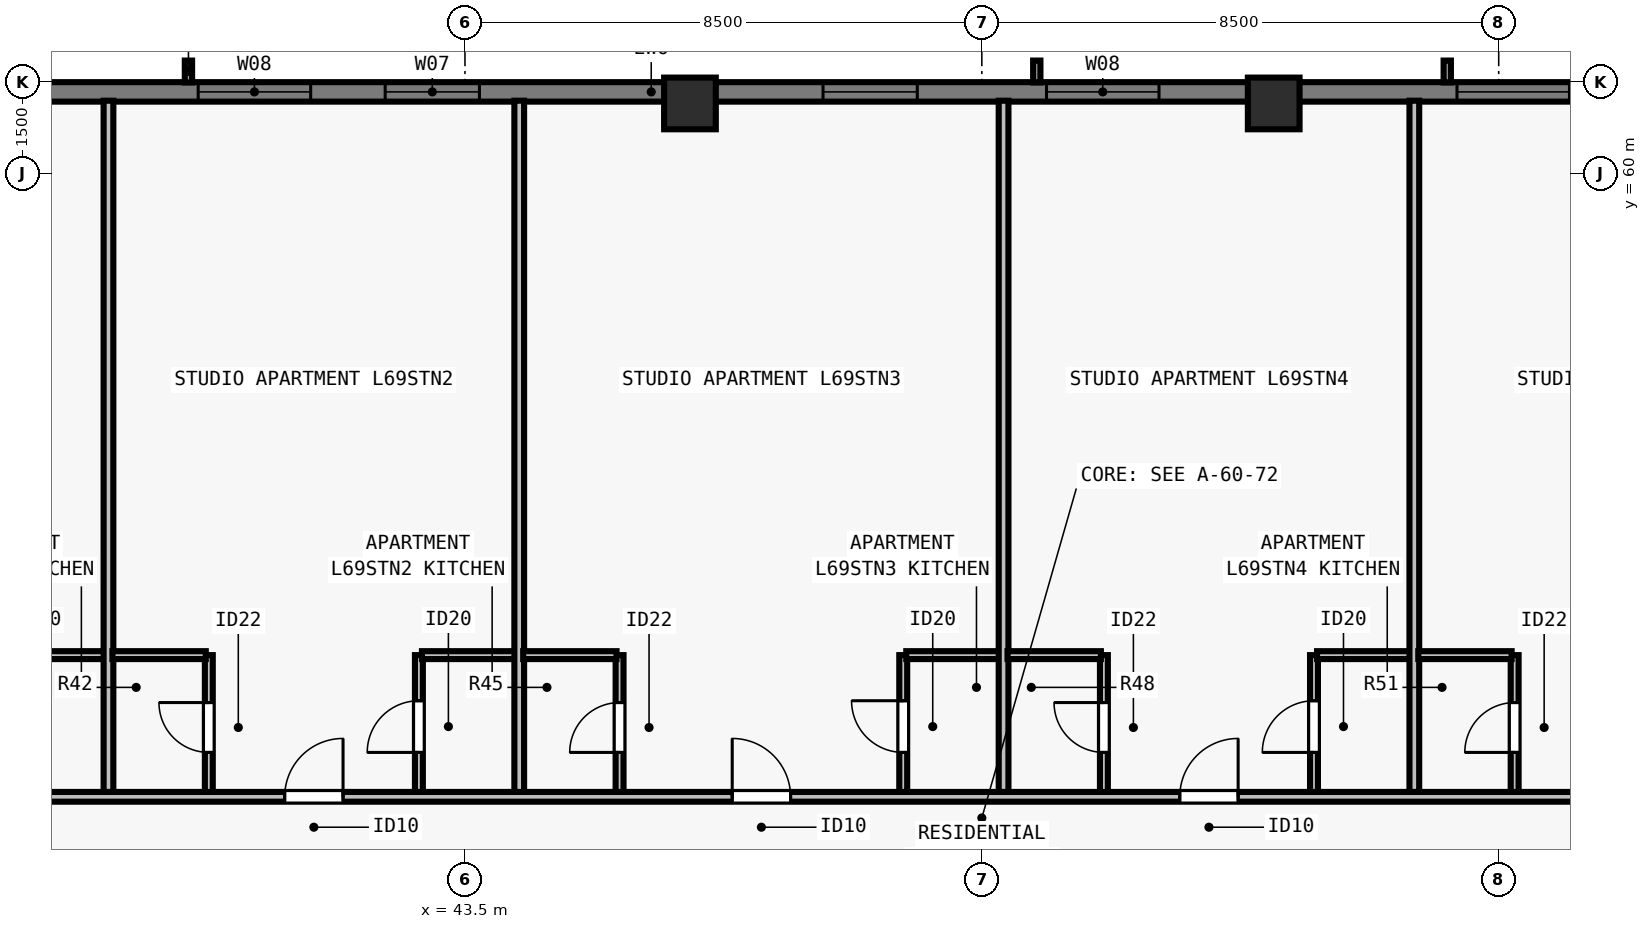
"""IFC4 building model, lengths in metres.
Left out: names, types, materials, properties, quantities, classifications, styles, units other than length and angle.
Written with IfcOpenShell. Run it as: python <this file> out.ifc"""

import sys

from ifc_helpers import new_model, si_unit, direction, frame, frame_2d, origin, origin_2d, place, context, subcontext, project, spatial, rectangle, extrude, element, fill, save


model = new_model("IFC4")
c1 = context("Model", 3, precision=1e-05, world=origin(), true_north=direction((0.0, 1.0)))
c2 = subcontext(c1, "Body", "Model", "MODEL_VIEW")
j1 = project(units=[si_unit("LENGTHUNIT", "METRE"), si_unit("PLANEANGLEUNIT", "RADIAN")], contexts=[c1])
p1 = place(None, origin())
s1 = spatial("IfcSite", under=j1, at=p1, CompositionType="ELEMENT")
p2 = place(p1, origin())
s2 = spatial("IfcBuilding", under=s1, at=p2, CompositionType="ELEMENT")
p3 = place(p2, frame((0.0, 0.0, 251.5)))
s3 = spatial("IfcBuildingStorey", under=s2, at=p3, CompositionType="ELEMENT", Elevation=251.5)
for number, where, z_axis, x_axis in (
    (1, (56.8, 61.15, 0.0), (0.0, 0.0, 1.0), (1.0, 0.0, 0.0)),
    (2, (47.2, 61.15, 0.0), (0.0, 0.0, 1.0), (1.0, 0.0, 0.0)),
):
    element("IfcColumn", number, at=place(p3, frame(where, z_axis=z_axis, x_axis=x_axis)), inside=s3, PredefinedType="COLUMN", context=c2, shape_type="SweptSolid", body=[
        extrude(rectangle(XDim=0.85, YDim=0.85, at=origin_2d()), origin(), (0.0, 0.0, 1.0), 3.5),
    ])
p4 = place(p3, frame((34.5, 61.34, 0.0), z_axis=(0.0, 0.0, 1.0), x_axis=(1.0, 0.0, 0.0)))
e3 = element("IfcWall", 3, at=p4, inside=s3, PredefinedType="SOLIDWALL", context=c2, shape_type="SweptSolid", body=[
    extrude(rectangle(XDim=34.702, YDim=0.32, at=frame_2d((17.351, 0.0))), origin(), (0.0, 0.0, 1.0), 3.29),
])
p5 = place(p4, frame((4.613, 0.0, 0.8)))
e4 = element("IfcOpeningElement", 4, at=p5, cuts=e3, PredefinedType="OPENING", context=c2, shape_type="SweptSolid", body=[
    extrude(rectangle(XDim=1.85, YDim=1.678, at=frame_2d((0.925, 0.839))), frame((0.0, 0.17, 0.0), z_axis=(0.0, -1.0, 0.0), x_axis=(1.0, 0.0, 0.0)), (0.0, 0.0, 1.0), 0.34),
])
p6 = place(p4, frame((7.688, 0.0, 0.8)))
e5 = element("IfcOpeningElement", 5, at=p6, cuts=e3, PredefinedType="OPENING", context=c2, shape_type="SweptSolid", body=[
    extrude(rectangle(XDim=1.55, YDim=1.678, at=frame_2d((0.775, 0.839))), frame((0.0, 0.17, 0.0), z_axis=(0.0, -1.0, 0.0), x_axis=(1.0, 0.0, 0.0)), (0.0, 0.0, 1.0), 0.34),
])
p7 = place(p4, frame((14.888, 0.0, 0.8)))
e6 = element("IfcOpeningElement", 6, at=p7, cuts=e3, PredefinedType="OPENING", context=c2, shape_type="SweptSolid", body=[
    extrude(rectangle(XDim=1.55, YDim=1.678, at=frame_2d((0.775, 0.839))), frame((0.0, 0.17, 0.0), z_axis=(0.0, -1.0, 0.0), x_axis=(1.0, 0.0, 0.0)), (0.0, 0.0, 1.0), 0.34),
])
p8 = place(p4, frame((18.564, 0.0, 0.8)))
e7 = element("IfcOpeningElement", 7, at=p8, cuts=e3, PredefinedType="OPENING", context=c2, shape_type="SweptSolid", body=[
    extrude(rectangle(XDim=1.85, YDim=1.678, at=frame_2d((0.925, 0.839))), frame((0.0, 0.17, 0.0), z_axis=(0.0, -1.0, 0.0), x_axis=(1.0, 0.0, 0.0)), (0.0, 0.0, 1.0), 0.34),
])
p9 = place(p4, frame((25.314, 0.0, 0.8)))
e8 = element("IfcOpeningElement", 8, at=p9, cuts=e3, PredefinedType="OPENING", context=c2, shape_type="SweptSolid", body=[
    extrude(rectangle(XDim=1.85, YDim=1.678, at=frame_2d((0.925, 0.839))), frame((0.0, 0.17, 0.0), z_axis=(0.0, -1.0, 0.0), x_axis=(1.0, 0.0, 0.0)), (0.0, 0.0, 1.0), 0.34),
])
p10 = place(p4, frame((28.389, 0.0, 0.8)))
e9 = element("IfcOpeningElement", 9, at=p10, cuts=e3, PredefinedType="OPENING", context=c2, shape_type="SweptSolid", body=[
    extrude(rectangle(XDim=1.55, YDim=1.678, at=frame_2d((0.775, 0.839))), frame((0.0, 0.17, 0.0), z_axis=(0.0, -1.0, 0.0), x_axis=(1.0, 0.0, 0.0)), (0.0, 0.0, 1.0), 0.34),
])
p11 = place(p3, frame((29.805, 49.748, 0.0), z_axis=(0.0, 0.0, 1.0), x_axis=(1.0, 0.0, 0.0)))
e10 = element("IfcWall", 10, at=p11, inside=s3, PredefinedType="PARTITIONING", context=c2, shape_type="SweptSolid", body=[
    extrude(rectangle(XDim=44.39, YDim=0.16, at=frame_2d((22.195, 0.0))), origin(), (0.0, 0.0, 1.0), 2.958),
])
p12 = place(p11, frame((3.494, 0.0, 0.0)))
e11 = element("IfcOpeningElement", 11, at=p12, cuts=e10, PredefinedType="OPENING", context=c2, shape_type="SweptSolid", body=[
    extrude(rectangle(XDim=0.96, YDim=2.18, at=frame_2d((0.48, 1.09))), frame((0.0, 0.09, 0.0), z_axis=(0.0, -1.0, 0.0), x_axis=(1.0, 0.0, 0.0)), (0.0, 0.0, 1.0), 0.18),
])
p13 = place(p11, frame((10.73, 0.0, 0.0)))
e12 = element("IfcOpeningElement", 12, at=p13, cuts=e10, PredefinedType="OPENING", context=c2, shape_type="SweptSolid", body=[
    extrude(rectangle(XDim=0.96, YDim=2.18, at=frame_2d((0.48, 1.09))), frame((0.0, 0.09, 0.0), z_axis=(0.0, -1.0, 0.0), x_axis=(1.0, 0.0, 0.0)), (0.0, 0.0, 1.0), 0.18),
])
p14 = place(p11, frame((18.09, 0.0, 0.0)))
e13 = element("IfcOpeningElement", 13, at=p14, cuts=e10, PredefinedType="OPENING", context=c2, shape_type="SweptSolid", body=[
    extrude(rectangle(XDim=0.96, YDim=2.18, at=frame_2d((0.48, 1.09))), frame((0.0, 0.09, 0.0), z_axis=(0.0, -1.0, 0.0), x_axis=(1.0, 0.0, 0.0)), (0.0, 0.0, 1.0), 0.18),
])
p15 = place(p11, frame((25.45, 0.0, 0.0)))
e14 = element("IfcOpeningElement", 14, at=p15, cuts=e10, PredefinedType="OPENING", context=c2, shape_type="SweptSolid", body=[
    extrude(rectangle(XDim=0.96, YDim=2.18, at=frame_2d((0.48, 1.09))), frame((0.0, 0.09, 0.0), z_axis=(0.0, -1.0, 0.0), x_axis=(1.0, 0.0, 0.0)), (0.0, 0.0, 1.0), 0.18),
])
p16 = place(p11, frame((32.81, 0.0, 0.0)))
e15 = element("IfcOpeningElement", 15, at=p16, cuts=e10, PredefinedType="OPENING", context=c2, shape_type="SweptSolid", body=[
    extrude(rectangle(XDim=0.96, YDim=2.18, at=frame_2d((0.48, 1.09))), frame((0.0, 0.09, 0.0), z_axis=(0.0, -1.0, 0.0), x_axis=(1.0, 0.0, 0.0)), (0.0, 0.0, 1.0), 0.18),
])
p17 = place(p11, frame((40.294, 0.0, 0.0)))
e16 = element("IfcOpeningElement", 16, at=p17, cuts=e10, PredefinedType="OPENING", context=c2, shape_type="SweptSolid", body=[
    extrude(rectangle(XDim=0.96, YDim=2.18, at=frame_2d((0.48, 1.09))), frame((0.0, 0.09, 0.0), z_axis=(0.0, -1.0, 0.0), x_axis=(1.0, 0.0, 0.0)), (0.0, 0.0, 1.0), 0.18),
])
p18 = place(p3, frame((36.038, 52.077, 0.0), z_axis=(0.0, 0.0, 1.0), x_axis=(1.0, 0.0, 0.0)))
e17 = element("IfcWall", 17, at=p18, inside=s3, PredefinedType="PLUMBINGWALL", context=c2, shape_type="SweptSolid", body=[
    extrude(rectangle(XDim=1.6, YDim=0.13, at=frame_2d((0.8, 0.0))), origin(), (0.0, 0.0, 1.0), 2.958),
])
p19 = place(p3, frame((37.637, 49.827, 0.0), z_axis=(0.0, 0.0, 1.0), x_axis=(0.0, 1.0, 0.0)))
e18 = element("IfcWall", 18, at=p19, inside=s3, PredefinedType="PARTITIONING", context=c2, shape_type="SweptSolid", body=[
    extrude(rectangle(XDim=11.368, YDim=0.16, at=frame_2d((5.684, 0.0))), origin(), (0.0, 0.0, 1.0), 2.573),
])
p20 = place(p3, frame((39.288, 49.827, 0.0), z_axis=(0.0, 0.0, 1.0), x_axis=(0.0, 1.0, 0.0)))
e19 = element("IfcWall", 19, at=p20, inside=s3, PredefinedType="PLUMBINGWALL", context=c2, shape_type="SweptSolid", body=[
    extrude(rectangle(XDim=2.25, YDim=0.13, at=frame_2d((1.125, 0.0))), origin(), (0.0, 0.0, 1.0), 3.29),
])
p21 = place(p20, frame((0.65, 0.0, 0.0)))
e20 = element("IfcOpeningElement", 20, at=p21, cuts=e19, PredefinedType="OPENING", context=c2, shape_type="SweptSolid", body=[
    extrude(rectangle(XDim=0.82, YDim=2.1, at=frame_2d((0.41, 1.05))), frame((0.0, 0.075, 0.0), z_axis=(0.0, -1.0, 0.0), x_axis=(1.0, 0.0, 0.0)), (0.0, 0.0, 1.0), 0.15),
])
p22 = place(p3, frame((37.702, 52.077, 0.0), z_axis=(0.0, 0.0, 1.0), x_axis=(1.0, 0.0, 0.0)))
e21 = element("IfcWall", 21, at=p22, inside=s3, PredefinedType="PLUMBINGWALL", context=c2, shape_type="SweptSolid", body=[
    extrude(rectangle(XDim=1.535, YDim=0.13, at=frame_2d((0.768, 0.0))), origin(), (0.0, 0.0, 1.0), 3.29),
])
p23 = place(p3, frame((42.742, 49.827, 0.0), z_axis=(0.0, 0.0, 1.0), x_axis=(0.0, 1.0, 0.0)))
e22 = element("IfcWall", 22, at=p23, inside=s3, PredefinedType="PLUMBINGWALL", context=c2, shape_type="SweptSolid", body=[
    extrude(rectangle(XDim=2.25, YDim=0.13, at=frame_2d((1.125, 0.0))), origin(), (0.0, 0.0, 1.0), 3.29),
])
p24 = place(p23, frame((0.65, 0.0, 0.0)))
e23 = element("IfcOpeningElement", 23, at=p24, cuts=e22, PredefinedType="OPENING", context=c2, shape_type="SweptSolid", body=[
    extrude(rectangle(XDim=0.85, YDim=2.1, at=frame_2d((0.425, 1.05))), frame((0.0, 0.075, 0.0), z_axis=(0.0, -1.0, 0.0), x_axis=(1.0, 0.0, 0.0)), (0.0, 0.0, 1.0), 0.15),
])
p25 = place(p3, frame((42.792, 52.077, 0.0), z_axis=(0.0, 0.0, 1.0), x_axis=(1.0, 0.0, 0.0)))
e24 = element("IfcWall", 24, at=p25, inside=s3, PredefinedType="PLUMBINGWALL", context=c2, shape_type="SweptSolid", body=[
    extrude(rectangle(XDim=1.6, YDim=0.13, at=frame_2d((0.8, 0.0))), origin(), (0.0, 0.0, 1.0), 3.29),
])
p26 = place(p3, frame((44.393, 49.827, 0.0), z_axis=(0.0, 0.0, 1.0), x_axis=(0.0, 1.0, 0.0)))
e25 = element("IfcWall", 25, at=p26, inside=s3, PredefinedType="PARTITIONING", context=c2, shape_type="SweptSolid", body=[
    extrude(rectangle(XDim=11.368, YDim=0.16, at=frame_2d((5.684, 0.0))), origin(), (0.0, 0.0, 1.0), 3.29),
])
p27 = place(p3, frame((46.042, 49.827, 0.0), z_axis=(0.0, 0.0, 1.0), x_axis=(0.0, 1.0, 0.0)))
e26 = element("IfcWall", 26, at=p27, inside=s3, PredefinedType="PLUMBINGWALL", context=c2, shape_type="SweptSolid", body=[
    extrude(rectangle(XDim=2.25, YDim=0.13, at=frame_2d((1.125, 0.0))), origin(), (0.0, 0.0, 1.0), 3.29),
])
p28 = place(p27, frame((0.65, 0.0, 0.0)))
e27 = element("IfcOpeningElement", 27, at=p28, cuts=e26, PredefinedType="OPENING", context=c2, shape_type="SweptSolid", body=[
    extrude(rectangle(XDim=0.82, YDim=2.1, at=frame_2d((0.41, 1.05))), frame((0.0, 0.075, 0.0), z_axis=(0.0, -1.0, 0.0), x_axis=(1.0, 0.0, 0.0)), (0.0, 0.0, 1.0), 0.15),
])
p29 = place(p3, frame((44.458, 52.077, 0.0), z_axis=(0.0, 0.0, 1.0), x_axis=(1.0, 0.0, 0.0)))
e28 = element("IfcWall", 28, at=p29, inside=s3, PredefinedType="PLUMBINGWALL", context=c2, shape_type="SweptSolid", body=[
    extrude(rectangle(XDim=1.535, YDim=0.13, at=frame_2d((0.768, 0.0))), origin(), (0.0, 0.0, 1.0), 3.29),
])
p30 = place(p3, frame((50.708, 49.827, 0.0), z_axis=(0.0, 0.0, 1.0), x_axis=(0.0, 1.0, 0.0)))
e29 = element("IfcWall", 29, at=p30, inside=s3, PredefinedType="PLUMBINGWALL", context=c2, shape_type="SweptSolid", body=[
    extrude(rectangle(XDim=2.25, YDim=0.13, at=frame_2d((1.125, 0.0))), origin(), (0.0, 0.0, 1.0), 3.29),
])
p31 = place(p30, frame((0.65, 0.0, 0.0)))
e30 = element("IfcOpeningElement", 30, at=p31, cuts=e29, PredefinedType="OPENING", context=c2, shape_type="SweptSolid", body=[
    extrude(rectangle(XDim=0.85, YDim=2.1, at=frame_2d((0.425, 1.05))), frame((0.0, 0.075, 0.0), z_axis=(0.0, -1.0, 0.0), x_axis=(1.0, 0.0, 0.0)), (0.0, 0.0, 1.0), 0.15),
])
p32 = place(p3, frame((50.758, 52.077, 0.0), z_axis=(0.0, 0.0, 1.0), x_axis=(1.0, 0.0, 0.0)))
e31 = element("IfcWall", 31, at=p32, inside=s3, PredefinedType="PLUMBINGWALL", context=c2, shape_type="SweptSolid", body=[
    extrude(rectangle(XDim=1.6, YDim=0.13, at=frame_2d((0.8, 0.0))), origin(), (0.0, 0.0, 1.0), 3.29),
])
p33 = place(p3, frame((52.357, 49.827, 0.0), z_axis=(0.0, 0.0, 1.0), x_axis=(0.0, 1.0, 0.0)))
e32 = element("IfcWall", 32, at=p33, inside=s3, PredefinedType="PARTITIONING", context=c2, shape_type="SweptSolid", body=[
    extrude(rectangle(XDim=11.368, YDim=0.16, at=frame_2d((5.684, 0.0))), origin(), (0.0, 0.0, 1.0), 2.958),
])
p34 = place(p3, frame((54.008, 49.827, 0.0), z_axis=(0.0, 0.0, 1.0), x_axis=(0.0, 1.0, 0.0)))
e33 = element("IfcWall", 33, at=p34, inside=s3, PredefinedType="PLUMBINGWALL", context=c2, shape_type="SweptSolid", body=[
    extrude(rectangle(XDim=2.25, YDim=0.13, at=frame_2d((1.125, 0.0))), origin(), (0.0, 0.0, 1.0), 3.29),
])
p35 = place(p34, frame((0.65, 0.0, 0.0)))
e34 = element("IfcOpeningElement", 34, at=p35, cuts=e33, PredefinedType="OPENING", context=c2, shape_type="SweptSolid", body=[
    extrude(rectangle(XDim=0.82, YDim=2.1, at=frame_2d((0.41, 1.05))), frame((0.0, 0.075, 0.0), z_axis=(0.0, -1.0, 0.0), x_axis=(1.0, 0.0, 0.0)), (0.0, 0.0, 1.0), 0.15),
])
p36 = place(p3, frame((52.423, 52.077, 0.0), z_axis=(0.0, 0.0, 1.0), x_axis=(1.0, 0.0, 0.0)))
e35 = element("IfcWall", 35, at=p36, inside=s3, PredefinedType="PLUMBINGWALL", context=c2, shape_type="SweptSolid", body=[
    extrude(rectangle(XDim=1.535, YDim=0.13, at=frame_2d((0.768, 0.0))), origin(), (0.0, 0.0, 1.0), 3.29),
])
p37 = place(p3, frame((57.462, 49.827, 0.0), z_axis=(0.0, 0.0, 1.0), x_axis=(0.0, 1.0, 0.0)))
e36 = element("IfcWall", 36, at=p37, inside=s3, PredefinedType="PLUMBINGWALL", context=c2, shape_type="SweptSolid", body=[
    extrude(rectangle(XDim=2.25, YDim=0.13, at=frame_2d((1.125, 0.0))), origin(), (0.0, 0.0, 1.0), 3.29),
])
p38 = place(p37, frame((0.65, 0.0, 0.0)))
e37 = element("IfcOpeningElement", 37, at=p38, cuts=e36, PredefinedType="OPENING", context=c2, shape_type="SweptSolid", body=[
    extrude(rectangle(XDim=0.85, YDim=2.1, at=frame_2d((0.425, 1.05))), frame((0.0, 0.075, 0.0), z_axis=(0.0, -1.0, 0.0), x_axis=(1.0, 0.0, 0.0)), (0.0, 0.0, 1.0), 0.15),
])
p39 = place(p3, frame((57.512, 52.077, 0.0), z_axis=(0.0, 0.0, 1.0), x_axis=(1.0, 0.0, 0.0)))
e38 = element("IfcWall", 38, at=p39, inside=s3, PredefinedType="PLUMBINGWALL", context=c2, shape_type="SweptSolid", body=[
    extrude(rectangle(XDim=1.6, YDim=0.13, at=frame_2d((0.8, 0.0))), origin(), (0.0, 0.0, 1.0), 3.29),
])
p40 = place(p3, frame((59.113, 49.827, 0.0), z_axis=(0.0, 0.0, 1.0), x_axis=(0.0, 1.0, 0.0)))
e39 = element("IfcWall", 39, at=p40, inside=s3, PredefinedType="PARTITIONING", context=c2, shape_type="SweptSolid", body=[
    extrude(rectangle(XDim=11.368, YDim=0.16, at=frame_2d((5.684, 0.0))), origin(), (0.0, 0.0, 1.0), 3.29),
])
p41 = place(p3, frame((60.762, 49.827, 0.0), z_axis=(0.0, 0.0, 1.0), x_axis=(0.0, 1.0, 0.0)))
e40 = element("IfcWall", 40, at=p41, inside=s3, PredefinedType="PLUMBINGWALL", context=c2, shape_type="SweptSolid", body=[
    extrude(rectangle(XDim=2.25, YDim=0.13, at=frame_2d((1.125, 0.0))), origin(), (0.0, 0.0, 1.0), 3.29),
])
p42 = place(p41, frame((0.65, 0.0, 0.0)))
e41 = element("IfcOpeningElement", 41, at=p42, cuts=e40, PredefinedType="OPENING", context=c2, shape_type="SweptSolid", body=[
    extrude(rectangle(XDim=0.82, YDim=2.1, at=frame_2d((0.41, 1.05))), frame((0.0, 0.075, 0.0), z_axis=(0.0, -1.0, 0.0), x_axis=(1.0, 0.0, 0.0)), (0.0, 0.0, 1.0), 0.15),
])
p43 = place(p3, frame((59.177, 52.077, 0.0), z_axis=(0.0, 0.0, 1.0), x_axis=(1.0, 0.0, 0.0)))
e42 = element("IfcWall", 42, at=p43, inside=s3, PredefinedType="PLUMBINGWALL", context=c2, shape_type="SweptSolid", body=[
    extrude(rectangle(XDim=1.535, YDim=0.13, at=frame_2d((0.768, 0.0))), origin(), (0.0, 0.0, 1.0), 3.29),
])
p44 = place(p5, origin())
e43 = element("IfcWindow", 43, at=p44, inside=s3, PartitioningType="SINGLE_PANEL", PredefinedType="WINDOW", context=c2, shape_type="SweptSolid", body=[
    extrude(rectangle(XDim=1.85, YDim=1.678, at=frame_2d((0.925, 0.839))), frame((0.0, -0.05, 0.0), z_axis=(0.0, -1.0, 0.0), x_axis=(1.0, 0.0, 0.0)), (0.0, 0.0, 1.0), 0.06),
])
fill(e4, e43)
p45 = place(p6, origin())
e44 = element("IfcWindow", 44, at=p45, inside=s3, PartitioningType="SINGLE_PANEL", PredefinedType="WINDOW", context=c2, shape_type="SweptSolid", body=[
    extrude(rectangle(XDim=1.55, YDim=1.678, at=frame_2d((0.775, 0.839))), frame((0.0, -0.05, 0.0), z_axis=(0.0, -1.0, 0.0), x_axis=(1.0, 0.0, 0.0)), (0.0, 0.0, 1.0), 0.06),
])
fill(e5, e44)
p46 = place(p7, origin())
e45 = element("IfcWindow", 45, at=p46, inside=s3, PartitioningType="SINGLE_PANEL", PredefinedType="WINDOW", context=c2, shape_type="SweptSolid", body=[
    extrude(rectangle(XDim=1.55, YDim=1.678, at=frame_2d((0.775, 0.839))), frame((0.0, -0.05, 0.0), z_axis=(0.0, -1.0, 0.0), x_axis=(1.0, 0.0, 0.0)), (0.0, 0.0, 1.0), 0.06),
])
fill(e6, e45)
p47 = place(p8, origin())
e46 = element("IfcWindow", 46, at=p47, inside=s3, PartitioningType="SINGLE_PANEL", PredefinedType="WINDOW", context=c2, shape_type="SweptSolid", body=[
    extrude(rectangle(XDim=1.85, YDim=1.678, at=frame_2d((0.925, 0.839))), frame((0.0, -0.05, 0.0), z_axis=(0.0, -1.0, 0.0), x_axis=(1.0, 0.0, 0.0)), (0.0, 0.0, 1.0), 0.06),
])
fill(e7, e46)
p48 = place(p9, origin())
e47 = element("IfcWindow", 47, at=p48, inside=s3, PartitioningType="SINGLE_PANEL", PredefinedType="WINDOW", context=c2, shape_type="SweptSolid", body=[
    extrude(rectangle(XDim=1.85, YDim=1.678, at=frame_2d((0.925, 0.839))), frame((0.0, -0.05, 0.0), z_axis=(0.0, -1.0, 0.0), x_axis=(1.0, 0.0, 0.0)), (0.0, 0.0, 1.0), 0.06),
])
fill(e8, e47)
p49 = place(p21, origin())
e48 = element("IfcDoor", 48, at=p49, inside=s3, OperationType="SINGLE_SWING_RIGHT", PredefinedType="DOOR", context=c2, shape_type="SweptSolid", body=[
    extrude(rectangle(XDim=0.82, YDim=2.1, at=frame_2d((0.41, 1.05))), frame((0.0, 0.025, 0.0), z_axis=(0.0, -1.0, 0.0), x_axis=(1.0, 0.0, 0.0)), (0.0, 0.0, 1.0), 0.05),
])
fill(e20, e48)
p50 = place(p24, origin())
e49 = element("IfcDoor", 49, at=p50, inside=s3, OperationType="SINGLE_SWING_LEFT", PredefinedType="DOOR", context=c2, shape_type="SweptSolid", body=[
    extrude(rectangle(XDim=0.85, YDim=2.1, at=frame_2d((0.425, 1.05))), frame((0.0, 0.025, 0.0), z_axis=(0.0, -1.0, 0.0), x_axis=(1.0, 0.0, 0.0)), (0.0, 0.0, 1.0), 0.05),
])
fill(e23, e49)
p51 = place(p13, origin())
e50 = element("IfcDoor", 50, at=p51, inside=s3, OperationType="SINGLE_SWING_RIGHT", PredefinedType="DOOR", context=c2, shape_type="SweptSolid", body=[
    extrude(rectangle(XDim=0.96, YDim=2.18, at=frame_2d((0.48, 1.09))), frame((0.0, 0.025, 0.0), z_axis=(0.0, -1.0, 0.0), x_axis=(1.0, 0.0, 0.0)), (0.0, 0.0, 1.0), 0.05),
])
fill(e12, e50)
p52 = place(p28, origin())
e51 = element("IfcDoor", 51, at=p52, inside=s3, OperationType="SINGLE_SWING_LEFT", PredefinedType="DOOR", context=c2, shape_type="SweptSolid", body=[
    extrude(rectangle(XDim=0.82, YDim=2.1, at=frame_2d((0.41, 1.05))), frame((0.0, 0.025, 0.0), z_axis=(0.0, -1.0, 0.0), x_axis=(1.0, 0.0, 0.0)), (0.0, 0.0, 1.0), 0.05),
])
fill(e27, e51)
p53 = place(p31, origin())
e52 = element("IfcDoor", 52, at=p53, inside=s3, OperationType="SINGLE_SWING_RIGHT", PredefinedType="DOOR", context=c2, shape_type="SweptSolid", body=[
    extrude(rectangle(XDim=0.85, YDim=2.1, at=frame_2d((0.425, 1.05))), frame((0.0, 0.025, 0.0), z_axis=(0.0, -1.0, 0.0), x_axis=(1.0, 0.0, 0.0)), (0.0, 0.0, 1.0), 0.05),
])
fill(e30, e52)
p54 = place(p14, origin())
e53 = element("IfcDoor", 53, at=p54, inside=s3, OperationType="SINGLE_SWING_LEFT", PredefinedType="DOOR", context=c2, shape_type="SweptSolid", body=[
    extrude(rectangle(XDim=0.96, YDim=2.18, at=frame_2d((0.48, 1.09))), frame((0.0, 0.025, 0.0), z_axis=(0.0, -1.0, 0.0), x_axis=(1.0, 0.0, 0.0)), (0.0, 0.0, 1.0), 0.05),
])
fill(e13, e53)
p55 = place(p35, origin())
e54 = element("IfcDoor", 54, at=p55, inside=s3, OperationType="SINGLE_SWING_RIGHT", PredefinedType="DOOR", context=c2, shape_type="SweptSolid", body=[
    extrude(rectangle(XDim=0.82, YDim=2.1, at=frame_2d((0.41, 1.05))), frame((0.0, 0.025, 0.0), z_axis=(0.0, -1.0, 0.0), x_axis=(1.0, 0.0, 0.0)), (0.0, 0.0, 1.0), 0.05),
])
fill(e34, e54)
p56 = place(p38, origin())
e55 = element("IfcDoor", 55, at=p56, inside=s3, OperationType="SINGLE_SWING_LEFT", PredefinedType="DOOR", context=c2, shape_type="SweptSolid", body=[
    extrude(rectangle(XDim=0.85, YDim=2.1, at=frame_2d((0.425, 1.05))), frame((0.0, 0.025, 0.0), z_axis=(0.0, -1.0, 0.0), x_axis=(1.0, 0.0, 0.0)), (0.0, 0.0, 1.0), 0.05),
])
fill(e37, e55)
p57 = place(p15, origin())
e56 = element("IfcDoor", 56, at=p57, inside=s3, OperationType="SINGLE_SWING_RIGHT", PredefinedType="DOOR", context=c2, shape_type="SweptSolid", body=[
    extrude(rectangle(XDim=0.96, YDim=2.18, at=frame_2d((0.48, 1.09))), frame((0.0, 0.025, 0.0), z_axis=(0.0, -1.0, 0.0), x_axis=(1.0, 0.0, 0.0)), (0.0, 0.0, 1.0), 0.05),
])
fill(e14, e56)
p58 = place(p42, origin())
e57 = element("IfcDoor", 57, at=p58, inside=s3, OperationType="SINGLE_SWING_LEFT", PredefinedType="DOOR", context=c2, shape_type="SweptSolid", body=[
    extrude(rectangle(XDim=0.82, YDim=2.1, at=frame_2d((0.41, 1.05))), frame((0.0, 0.025, 0.0), z_axis=(0.0, -1.0, 0.0), x_axis=(1.0, 0.0, 0.0)), (0.0, 0.0, 1.0), 0.05),
])
fill(e41, e57)
save(model, sys.argv[1])
